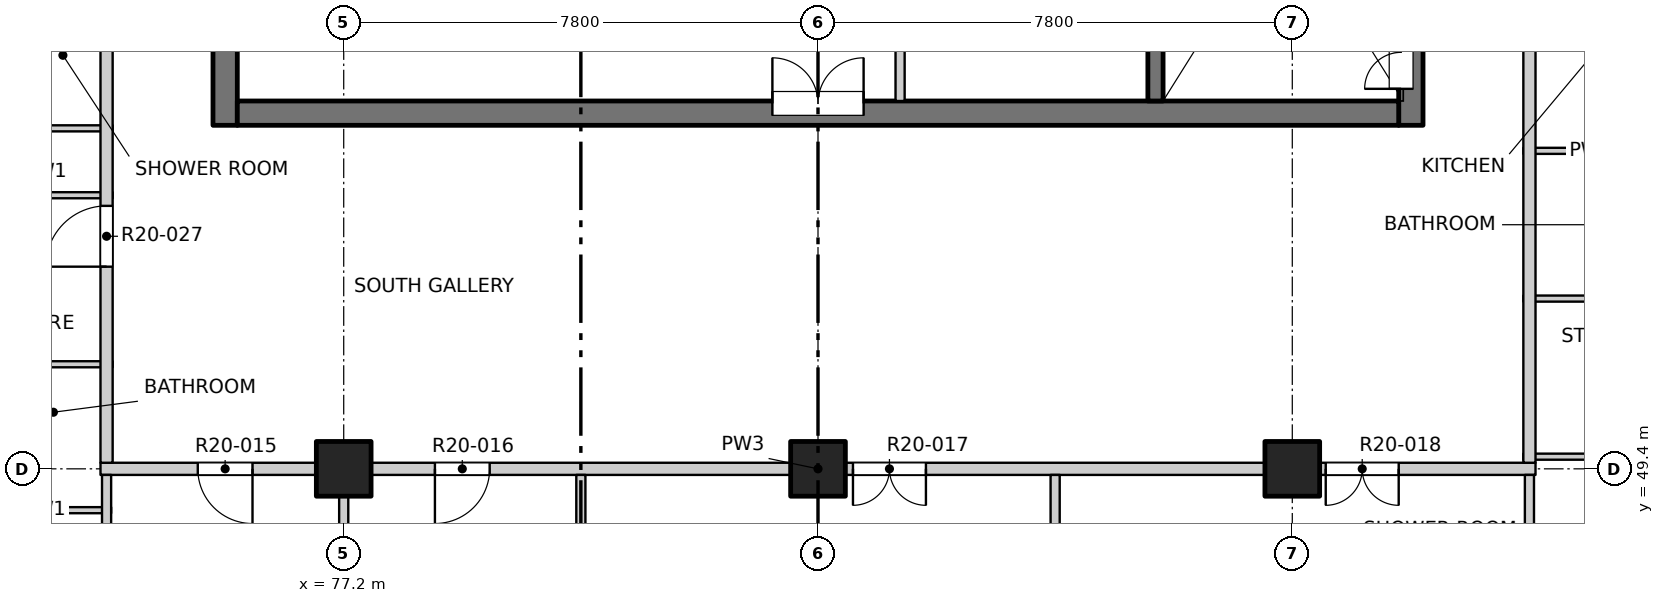
"""IFC4 building model, lengths in metres.
Left out: names, types, materials, properties, quantities, classifications, styles, units other than length and angle.
Written with IfcOpenShell. Run it as: python <this file> out.ifc"""

import sys

from ifc_helpers import new_model, si_unit, direction, frame, frame_2d, origin, origin_2d, place, context, subcontext, project, spatial, rectangle, extrude, element, fill, save


model = new_model("IFC4")
c1 = context("Model", 3, precision=1e-05, world=origin(), true_north=direction((0.0, 1.0)))
c2 = subcontext(c1, "Body", "Model", "MODEL_VIEW")
j1 = project(units=[si_unit("LENGTHUNIT", "METRE"), si_unit("PLANEANGLEUNIT", "RADIAN")], contexts=[c1])
p1 = place(None, origin())
s1 = spatial("IfcSite", under=j1, at=p1, CompositionType="ELEMENT")
p2 = place(p1, origin())
s2 = spatial("IfcBuilding", under=s1, at=p2, CompositionType="ELEMENT")
p3 = place(p2, frame((0.0, 0.0, 210.9)))
s3 = spatial("IfcBuildingStorey", under=s2, at=p3, CompositionType="ELEMENT", Elevation=210.9)
for number, where, z_axis, x_axis in (
    (1, (77.2, 49.4, -0.25), (0.0, 0.0, 1.0), (1.0, 0.0, 0.0)),
    (2, (85.0, 49.4, -0.25), (0.0, 0.0, 1.0), (1.0, 0.0, 0.0)),
    (3, (92.8, 49.4, -0.25), (0.0, 0.0, 1.0), (1.0, 0.0, 0.0)),
):
    element("IfcColumn", number, at=place(p3, frame(where, z_axis=z_axis, x_axis=x_axis)), inside=s3, PredefinedType="COLUMN", context=c2, shape_type="SweptSolid", body=[
        extrude(rectangle(XDim=0.9, YDim=0.9, at=origin_2d()), origin(), (0.0, 0.0, 1.0), 3.4),
    ])
p4 = place(p3, frame((75.25, 55.05, -0.25), z_axis=(0.0, 0.0, 1.0), x_axis=(0.0, 1.0, 0.0)))
e4 = element("IfcWall", 4, at=p4, inside=s3, PredefinedType="SOLIDWALL", context=c2, shape_type="SweptSolid", body=[
    extrude(rectangle(XDim=22.25, YDim=0.4, at=frame_2d((11.125, 0.0))), origin(), (0.0, 0.0, 1.0), 3.4),
])
p5 = place(p4, frame((7.4, 0.0, 0.25)))
e5 = element("IfcOpeningElement", 5, at=p5, cuts=e4, PredefinedType="OPENING", context=c2, shape_type="SweptSolid", body=[
    extrude(rectangle(XDim=0.9, YDim=2.1, at=frame_2d((0.45, 1.05))), frame((0.0, 0.21, 0.0), z_axis=(0.0, -1.0, 0.0), x_axis=(1.0, 0.0, 0.0)), (0.0, 0.0, 1.0), 0.42),
])
p6 = place(p4, frame((13.7, 0.0, 0.25)))
e6 = element("IfcOpeningElement", 6, at=p6, cuts=e4, PredefinedType="OPENING", context=c2, shape_type="SweptSolid", body=[
    extrude(rectangle(XDim=0.9, YDim=2.1, at=frame_2d((0.45, 1.05))), frame((0.0, 0.21, 0.0), z_axis=(0.0, -1.0, 0.0), x_axis=(1.0, 0.0, 0.0)), (0.0, 0.0, 1.0), 0.42),
])
p7 = place(p4, frame((20.0, 0.0, 0.25)))
e7 = element("IfcOpeningElement", 7, at=p7, cuts=e4, PredefinedType="OPENING", context=c2, shape_type="SweptSolid", body=[
    extrude(rectangle(XDim=0.9, YDim=2.1, at=frame_2d((0.45, 1.05))), frame((0.0, 0.21, 0.0), z_axis=(0.0, -1.0, 0.0), x_axis=(1.0, 0.0, 0.0)), (0.0, 0.0, 1.0), 0.42),
])
p8 = place(p3, frame((94.75, 55.05, -0.25), z_axis=(0.0, 0.0, 1.0), x_axis=(0.0, 1.0, 0.0)))
e8 = element("IfcWall", 8, at=p8, inside=s3, PredefinedType="SOLIDWALL", context=c2, shape_type="SweptSolid", body=[
    extrude(rectangle(XDim=6.9, YDim=0.4, at=frame_2d((3.45, 0.0))), origin(), (0.0, 0.0, 1.0), 3.4),
])
p9 = place(p8, frame((0.6, 0.0, 0.25)))
e9 = element("IfcOpeningElement", 9, at=p9, cuts=e8, PredefinedType="OPENING", context=c2, shape_type="SweptSolid", body=[
    extrude(rectangle(XDim=1.2, YDim=2.1, at=frame_2d((0.6, 1.05))), frame((0.0, 0.21, 0.0), z_axis=(0.0, -1.0, 0.0), x_axis=(1.0, 0.0, 0.0)), (0.0, 0.0, 1.0), 0.42),
])
p10 = place(p3, frame((75.45, 55.25, -0.25), z_axis=(0.0, 0.0, 1.0), x_axis=(1.0, 0.0, 0.0)))
e10 = element("IfcWall", 10, at=p10, inside=s3, PredefinedType="SOLIDWALL", context=c2, shape_type="SweptSolid", body=[
    extrude(rectangle(XDim=19.1, YDim=0.4, at=frame_2d((9.55, 0.0))), origin(), (0.0, 0.0, 1.0), 3.4),
])
p11 = place(p10, frame((8.8, 0.0, 0.25)))
e11 = element("IfcOpeningElement", 11, at=p11, cuts=e10, PredefinedType="OPENING", context=c2, shape_type="SweptSolid", body=[
    extrude(rectangle(XDim=1.5, YDim=2.1, at=frame_2d((0.75, 1.05))), frame((0.0, 0.21, 0.0), z_axis=(0.0, -1.0, 0.0), x_axis=(1.0, 0.0, 0.0)), (0.0, 0.0, 1.0), 0.42),
])
p12 = place(p3, frame((90.55, 55.45, -0.25), z_axis=(0.0, 0.0, 1.0), x_axis=(0.0, 1.0, 0.0)))
e12 = element("IfcWall", 12, at=p12, inside=s3, PredefinedType="SOLIDWALL", context=c2, shape_type="SweptSolid", body=[
    extrude(rectangle(XDim=6.5, YDim=0.25, at=frame_2d((3.25, 0.0))), origin(), (0.0, 0.0, 1.0), 3.4),
])
p13 = place(p3, frame((71.18, 48.72, 0.0), z_axis=(0.0, 0.0, 1.0), x_axis=(1.0, 0.0, 0.0)))
e13 = element("IfcWall", 13, at=p13, inside=s3, PredefinedType="PARTITIONING", context=c2, shape_type="SweptSolid", body=[
    extrude(rectangle(XDim=2.195, YDim=0.1, at=frame_2d((1.097, 0.0))), origin(), (0.0, 0.0, 1.0), 3.15),
])
p14 = place(p3, frame((73.2, 49.4, 0.0), z_axis=(0.0, 0.0, 1.0), x_axis=(1.0, 0.0, 0.0)))
e14 = element("IfcWall", 14, at=p14, inside=s3, PredefinedType="PARTITIONING", context=c2, shape_type="SweptSolid", body=[
    extrude(rectangle(XDim=23.6, YDim=0.2, at=frame_2d((11.8, 0.0))), origin(), (0.0, 0.0, 1.0), 3.15),
])
p15 = place(p14, frame((1.6, 0.0, 0.0)))
e15 = element("IfcOpeningElement", 15, at=p15, cuts=e14, PredefinedType="OPENING", context=c2, shape_type="SweptSolid", body=[
    extrude(rectangle(XDim=0.9, YDim=2.1, at=frame_2d((0.45, 1.05))), frame((0.0, 0.11, 0.0), z_axis=(0.0, -1.0, 0.0), x_axis=(1.0, 0.0, 0.0)), (0.0, 0.0, 1.0), 0.22),
])
p16 = place(p14, frame((5.5, 0.0, 0.0)))
e16 = element("IfcOpeningElement", 16, at=p16, cuts=e14, PredefinedType="OPENING", context=c2, shape_type="SweptSolid", body=[
    extrude(rectangle(XDim=0.9, YDim=2.1, at=frame_2d((0.45, 1.05))), frame((0.0, 0.11, 0.0), z_axis=(0.0, -1.0, 0.0), x_axis=(1.0, 0.0, 0.0)), (0.0, 0.0, 1.0), 0.22),
])
p17 = place(p14, frame((12.375, 0.0, 0.0)))
e17 = element("IfcOpeningElement", 17, at=p17, cuts=e14, PredefinedType="OPENING", context=c2, shape_type="SweptSolid", body=[
    extrude(rectangle(XDim=1.2, YDim=2.1, at=frame_2d((0.6, 1.05))), frame((0.0, 0.11, 0.0), z_axis=(0.0, -1.0, 0.0), x_axis=(1.0, 0.0, 0.0)), (0.0, 0.0, 1.0), 0.22),
])
p18 = place(p14, frame((20.15, 0.0, 0.0)))
e18 = element("IfcOpeningElement", 18, at=p18, cuts=e14, PredefinedType="OPENING", context=c2, shape_type="SweptSolid", body=[
    extrude(rectangle(XDim=1.2, YDim=2.1, at=frame_2d((0.6, 1.05))), frame((0.0, 0.11, 0.0), z_axis=(0.0, -1.0, 0.0), x_axis=(1.0, 0.0, 0.0)), (0.0, 0.0, 1.0), 0.22),
])
for number, where, z_axis, x_axis in (
    (19, (96.6, 49.6, 0.0), (0.0, 0.0, 1.0), (1.0, 0.0, 0.0)),
    (20, (71.18, 51.12, 0.0), (0.0, 0.0, 1.0), (1.0, 0.0, 0.0)),
    (21, (96.6, 52.2, 0.0), (0.0, 0.0, 1.0), (1.0, 0.0, 0.0)),
    (22, (71.18, 53.9, 0.0), (0.0, 0.0, 1.0), (1.0, 0.0, 0.0)),
    (23, (96.6, 54.63, 0.0), (0.0, 0.0, 1.0), (1.0, 0.0, 0.0)),
    (24, (71.18, 55.0, 0.0), (0.0, 0.0, 1.0), (1.0, 0.0, 0.0)),
):
    element("IfcWall", number, at=place(p3, frame(where, z_axis=z_axis, x_axis=x_axis)), inside=s3, PredefinedType="PARTITIONING", context=c2, shape_type="SweptSolid", body=[
        extrude(rectangle(XDim=2.22, YDim=0.1, at=frame_2d((1.11, 0.0))), origin(), (0.0, 0.0, 1.0), 3.15),
    ])
p19 = place(p3, frame((73.3, 41.9, 0.0), z_axis=(0.0, 0.0, 1.0), x_axis=(0.0, 1.0, 0.0)))
e25 = element("IfcWall", 25, at=p19, inside=s3, PredefinedType="PARTITIONING", context=c2, shape_type="SweptSolid", body=[
    extrude(rectangle(XDim=7.4, YDim=0.15, at=frame_2d((3.7, 0.0))), origin(), (0.0, 0.0, 1.0), 3.15),
])
p20 = place(p3, frame((73.3, 49.5, 0.0), z_axis=(0.0, 0.0, 1.0), x_axis=(0.0, 1.0, 0.0)))
e26 = element("IfcWall", 26, at=p20, inside=s3, PredefinedType="PARTITIONING", context=c2, shape_type="SweptSolid", body=[
    extrude(rectangle(XDim=34.9, YDim=0.2, at=frame_2d((17.45, 0.0))), origin(), (0.0, 0.0, 1.0), 3.15),
])
p21 = place(p20, frame((3.225, 0.0, 0.0)))
e27 = element("IfcOpeningElement", 27, at=p21, cuts=e26, PredefinedType="OPENING", context=c2, shape_type="SweptSolid", body=[
    extrude(rectangle(XDim=1.0, YDim=2.1, at=frame_2d((0.5, 1.05))), frame((0.0, 0.11, 0.0), z_axis=(0.0, -1.0, 0.0), x_axis=(1.0, 0.0, 0.0)), (0.0, 0.0, 1.0), 0.22),
])
p22 = place(p20, frame((25.125, 0.0, 0.0)))
e28 = element("IfcOpeningElement", 28, at=p22, cuts=e26, PredefinedType="OPENING", context=c2, shape_type="SweptSolid", body=[
    extrude(rectangle(XDim=1.0, YDim=2.1, at=frame_2d((0.5, 1.05))), frame((0.0, 0.11, 0.0), z_axis=(0.0, -1.0, 0.0), x_axis=(1.0, 0.0, 0.0)), (0.0, 0.0, 1.0), 0.22),
])
p23 = place(p20, frame((31.475, 0.0, 0.0)))
e29 = element("IfcOpeningElement", 29, at=p23, cuts=e26, PredefinedType="OPENING", context=c2, shape_type="SweptSolid", body=[
    extrude(rectangle(XDim=1.0, YDim=2.1, at=frame_2d((0.5, 1.05))), frame((0.0, 0.11, 0.0), z_axis=(0.0, -1.0, 0.0), x_axis=(1.0, 0.0, 0.0)), (0.0, 0.0, 1.0), 0.22),
])
p24 = place(p3, frame((77.2, 41.9, 0.0), z_axis=(0.0, 0.0, 1.0), x_axis=(0.0, 1.0, 0.0)))
e30 = element("IfcWall", 30, at=p24, inside=s3, PredefinedType="PARTITIONING", context=c2, shape_type="SweptSolid", body=[
    extrude(rectangle(XDim=7.4, YDim=0.15, at=frame_2d((3.7, 0.0))), origin(), (0.0, 0.0, 1.0), 3.15),
])
p25 = place(p3, frame((81.1, 41.9, 0.0), z_axis=(0.0, 0.0, 1.0), x_axis=(0.0, 1.0, 0.0)))
e31 = element("IfcWall", 31, at=p25, inside=s3, PredefinedType="PARTITIONING", context=c2, shape_type="SweptSolid", body=[
    extrude(rectangle(XDim=7.4, YDim=0.15, at=frame_2d((3.7, 0.0))), origin(), (0.0, 0.0, 1.0), 2.55),
])
p26 = place(p3, frame((86.35, 55.45, 0.0), z_axis=(0.0, 0.0, 1.0), x_axis=(0.0, 1.0, 0.0)))
e32 = element("IfcWall", 32, at=p26, inside=s3, PredefinedType="PARTITIONING", context=c2, shape_type="SweptSolid", body=[
    extrude(rectangle(XDim=5.575, YDim=0.15, at=frame_2d((2.788, 0.0))), origin(), (0.0, 0.0, 1.0), 3.15),
])
p27 = place(p26, frame((2.25, 0.0, 0.0)))
e33 = element("IfcOpeningElement", 33, at=p27, cuts=e32, PredefinedType="OPENING", context=c2, shape_type="SweptSolid", body=[
    extrude(rectangle(XDim=0.9, YDim=2.1, at=frame_2d((0.45, 1.05))), frame((0.0, 0.085, 0.0), z_axis=(0.0, -1.0, 0.0), x_axis=(1.0, 0.0, 0.0)), (0.0, 0.0, 1.0), 0.17),
])
p28 = place(p3, frame((88.9, 41.9, 0.0), z_axis=(0.0, 0.0, 1.0), x_axis=(0.0, 1.0, 0.0)))
e34 = element("IfcWall", 34, at=p28, inside=s3, PredefinedType="PARTITIONING", context=c2, shape_type="SweptSolid", body=[
    extrude(rectangle(XDim=7.4, YDim=0.15, at=frame_2d((3.7, 0.0))), origin(), (0.0, 0.0, 1.0), 2.55),
])
p29 = place(p3, frame((96.7, 41.9, 0.0), z_axis=(0.0, 0.0, 1.0), x_axis=(0.0, 1.0, 0.0)))
e35 = element("IfcWall", 35, at=p29, inside=s3, PredefinedType="PARTITIONING", context=c2, shape_type="SweptSolid", body=[
    extrude(rectangle(XDim=7.4, YDim=0.15, at=frame_2d((3.7, 0.0))), origin(), (0.0, 0.0, 1.0), 3.15),
])
p30 = place(p3, frame((96.7, 49.5, 0.0), z_axis=(0.0, 0.0, 1.0), x_axis=(0.0, 1.0, 0.0)))
e36 = element("IfcWall", 36, at=p30, inside=s3, PredefinedType="PARTITIONING", context=c2, shape_type="SweptSolid", body=[
    extrude(rectangle(XDim=34.9, YDim=0.2, at=frame_2d((17.45, 0.0))), origin(), (0.0, 0.0, 1.0), 3.15),
])
p31 = place(p30, frame((9.625, 0.0, 0.0)))
e37 = element("IfcOpeningElement", 37, at=p31, cuts=e36, PredefinedType="OPENING", context=c2, shape_type="SweptSolid", body=[
    extrude(rectangle(XDim=1.0, YDim=2.1, at=frame_2d((0.5, 1.05))), frame((0.0, 0.11, 0.0), z_axis=(0.0, -1.0, 0.0), x_axis=(1.0, 0.0, 0.0)), (0.0, 0.0, 1.0), 0.22),
])
p32 = place(p30, frame((14.125, 0.0, 0.0)))
e38 = element("IfcOpeningElement", 38, at=p32, cuts=e36, PredefinedType="OPENING", context=c2, shape_type="SweptSolid", body=[
    extrude(rectangle(XDim=1.0, YDim=2.1, at=frame_2d((0.5, 1.05))), frame((0.0, 0.11, 0.0), z_axis=(0.0, -1.0, 0.0), x_axis=(1.0, 0.0, 0.0)), (0.0, 0.0, 1.0), 0.22),
])
p33 = place(p30, frame((29.275, 0.0, 0.0)))
e39 = element("IfcOpeningElement", 39, at=p33, cuts=e36, PredefinedType="OPENING", context=c2, shape_type="SweptSolid", body=[
    extrude(rectangle(XDim=1.0, YDim=2.1, at=frame_2d((0.5, 1.05))), frame((0.0, 0.11, 0.0), z_axis=(0.0, -1.0, 0.0), x_axis=(1.0, 0.0, 0.0)), (0.0, 0.0, 1.0), 0.22),
])
p34 = place(p15, origin())
e40 = element("IfcDoor", 40, at=p34, inside=s3, OperationType="SINGLE_SWING_LEFT", PredefinedType="DOOR", context=c2, shape_type="SweptSolid", body=[
    extrude(rectangle(XDim=0.9, YDim=2.1, at=frame_2d((0.45, 1.05))), frame((0.0, 0.025, 0.0), z_axis=(0.0, -1.0, 0.0), x_axis=(1.0, 0.0, 0.0)), (0.0, 0.0, 1.0), 0.05),
])
fill(e15, e40)
p35 = place(p16, origin())
e41 = element("IfcDoor", 41, at=p35, inside=s3, OperationType="SINGLE_SWING_RIGHT", PredefinedType="DOOR", context=c2, shape_type="SweptSolid", body=[
    extrude(rectangle(XDim=0.9, YDim=2.1, at=frame_2d((0.45, 1.05))), frame((0.0, 0.025, 0.0), z_axis=(0.0, -1.0, 0.0), x_axis=(1.0, 0.0, 0.0)), (0.0, 0.0, 1.0), 0.05),
])
fill(e16, e41)
p36 = place(p17, origin())
e42 = element("IfcDoor", 42, at=p36, inside=s3, OperationType="DOUBLE_DOOR_SINGLE_SWING", PredefinedType="DOOR", context=c2, shape_type="SweptSolid", body=[
    extrude(rectangle(XDim=1.2, YDim=2.1, at=frame_2d((0.6, 1.05))), frame((0.0, 0.025, 0.0), z_axis=(0.0, -1.0, 0.0), x_axis=(1.0, 0.0, 0.0)), (0.0, 0.0, 1.0), 0.05),
])
fill(e17, e42)
p37 = place(p18, origin())
e43 = element("IfcDoor", 43, at=p37, inside=s3, OperationType="DOUBLE_DOOR_SINGLE_SWING", PredefinedType="DOOR", context=c2, shape_type="SweptSolid", body=[
    extrude(rectangle(XDim=1.2, YDim=2.1, at=frame_2d((0.6, 1.05))), frame((0.0, 0.025, 0.0), z_axis=(0.0, -1.0, 0.0), x_axis=(1.0, 0.0, 0.0)), (0.0, 0.0, 1.0), 0.05),
])
fill(e18, e43)
p38 = place(p21, origin())
e44 = element("IfcDoor", 44, at=p38, inside=s3, OperationType="SINGLE_SWING_LEFT", PredefinedType="DOOR", context=c2, shape_type="SweptSolid", body=[
    extrude(rectangle(XDim=1.0, YDim=2.1, at=frame_2d((0.5, 1.05))), frame((0.0, 0.025, 0.0), z_axis=(0.0, -1.0, 0.0), x_axis=(1.0, 0.0, 0.0)), (0.0, 0.0, 1.0), 0.05),
])
fill(e27, e44)
p39 = place(p11, origin())
e45 = element("IfcDoor", 45, at=p39, inside=s3, OperationType="DOUBLE_DOOR_SINGLE_SWING", PredefinedType="DOOR", context=c2, shape_type="SweptSolid", body=[
    extrude(rectangle(XDim=1.5, YDim=2.1, at=frame_2d((0.75, 1.05))), frame((0.0, 0.185, 0.0), z_axis=(0.0, -1.0, 0.0), x_axis=(1.0, 0.0, 0.0)), (0.0, 0.0, 1.0), 0.05),
])
fill(e11, e45)
p40 = place(p9, origin())
e46 = element("IfcDoor", 46, at=p40, inside=s3, OperationType="DOUBLE_DOOR_SINGLE_SWING", PredefinedType="DOOR", context=c2, shape_type="SweptSolid", body=[
    extrude(rectangle(XDim=1.2, YDim=2.1, at=frame_2d((0.6, 1.05))), frame((0.0, 0.185, 0.0), z_axis=(0.0, -1.0, 0.0), x_axis=(1.0, 0.0, 0.0)), (0.0, 0.0, 1.0), 0.05),
])
fill(e9, e46)
save(model, sys.argv[1])
